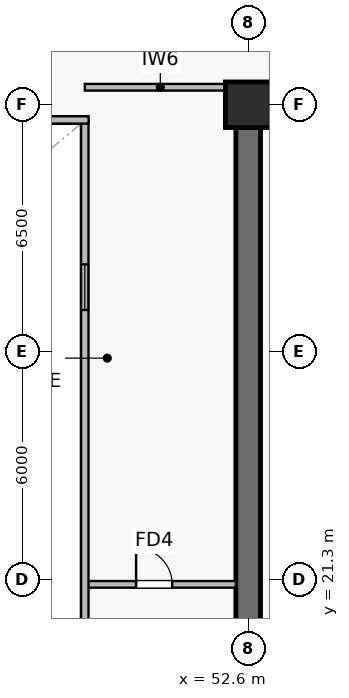
"""IFC4 building model, lengths in metres.
Left out: names, types, materials, properties, quantities, classifications, styles, units other than length and angle.
Written with IfcOpenShell. Run it as: python <this file> out.ifc"""

import sys

from ifc_helpers import new_model, si_unit, direction, frame, frame_2d, origin, origin_2d, place, context, subcontext, project, spatial, rectangle, extrude, source, transform, mapped, element, fill, save


model = new_model("IFC4")
c1 = context("Model", 3, precision=1e-05, world=origin(), true_north=direction((0.0, 1.0)))
c2 = subcontext(c1, "Body", "Model", "MODEL_VIEW")
j1 = project(units=[si_unit("LENGTHUNIT", "METRE"), si_unit("PLANEANGLEUNIT", "RADIAN")], contexts=[c1])
p1 = place(None, origin())
s1 = spatial("IfcSite", under=j1, at=p1, CompositionType="ELEMENT")
p2 = place(p1, origin())
s2 = spatial("IfcBuilding", under=s1, at=p2, CompositionType="ELEMENT")
p3 = place(p2, frame((0.0, 0.0, 113.3)))
s3 = spatial("IfcBuildingStorey", under=s2, at=p3, CompositionType="ELEMENT", Elevation=113.3)
p4 = place(p3, frame((52.275, 33.8, 0.0), z_axis=(0.0, 0.0, 1.0), x_axis=(1.0, 0.0, 0.0)))
e1 = element("IfcWall", 1, at=p4, inside=s3, PredefinedType="SHEAR", context=c2, shape_type="SweptSolid", body=[
    extrude(rectangle(XDim=15.45, YDim=0.65, at=frame_2d((7.725, 0.0))), origin(), (0.0, 0.0, 1.0), 3.79),
])
p5 = place(p4, frame((7.675, 0.0, 0.0)))
e2 = element("IfcOpeningElement", 2, at=p5, cuts=e1, PredefinedType="OPENING", context=c2, shape_type="SweptSolid", body=[
    extrude(rectangle(XDim=0.95, YDim=2.15, at=frame_2d((0.475, 1.075))), frame((0.0, 0.335, 0.0), z_axis=(0.0, -1.0, 0.0), x_axis=(1.0, 0.0, 0.0)), (0.0, 0.0, 1.0), 0.67),
])
p6 = place(p4, frame((2.61, 0.0, 0.0)))
e3 = element("IfcOpeningElement", 3, at=p6, cuts=e1, PredefinedType="OPENING", context=c2, shape_type="SweptSolid", body=[
    extrude(rectangle(XDim=0.95, YDim=2.15, at=frame_2d((0.475, 1.075))), frame((0.0, 0.335, 0.0), z_axis=(0.0, -1.0, 0.0), x_axis=(1.0, 0.0, 0.0)), (0.0, 0.0, 1.0), 0.67),
])
p7 = place(p3, frame((52.6, 15.125, 0.0), z_axis=(0.0, 0.0, 1.0), x_axis=(0.0, 1.0, 0.0)))
e4 = element("IfcWall", 4, at=p7, inside=s3, PredefinedType="SHEAR", context=c2, shape_type="SweptSolid", body=[
    extrude(rectangle(XDim=18.35, YDim=0.65, at=frame_2d((9.175, 0.0))), origin(), (0.0, 0.0, 1.0), 3.79),
])
p8 = place(p7, frame((3.425, 0.0, 0.0)))
e5 = element("IfcOpeningElement", 5, at=p8, cuts=e4, PredefinedType="OPENING", context=c2, shape_type="SweptSolid", body=[
    extrude(rectangle(XDim=1.42, YDim=2.2, at=frame_2d((0.71, 1.1))), frame((0.0, 0.335, 0.0), z_axis=(0.0, -1.0, 0.0), x_axis=(1.0, 0.0, 0.0)), (0.0, 0.0, 1.0), 0.67),
])
m1 = source(origin(), c2, "Body", "SweptSolid", [
    extrude(rectangle(XDim=1.2, YDim=1.2, at=origin_2d()), origin(), (0.0, 0.0, 1.0), 4.1),
])
p9 = place(p3, frame((52.6, 33.8, 0.0), z_axis=(0.0, 0.0, 1.0), x_axis=(1.0, 0.0, 0.0)))
e6 = element("IfcColumn", 6, at=p9, inside=s3, PredefinedType="COLUMN", context=c2, shape_type="MappedRepresentation", body=[
    mapped(m1, transform((0.0, 0.0, 0.0), scale=1.0)),
])
p10 = place(p3, frame((48.3, 34.26, 0.0), z_axis=(0.0, 0.0, 1.0), x_axis=(1.0, 0.0, 0.0)))
e7 = element("IfcWall", 7, at=p10, inside=s3, PredefinedType="PARTITIONING", context=c2, shape_type="SweptSolid", body=[
    extrude(rectangle(XDim=3.975, YDim=0.175, at=frame_2d((1.987, 0.0))), origin(), (0.0, 0.0, 1.0), 3.475),
])
p11 = place(p3, frame((48.3, 21.18, 0.0), z_axis=(0.0, 0.0, 1.0), x_axis=(1.0, 0.0, 0.0)))
e8 = element("IfcWall", 8, at=p11, inside=s3, PredefinedType="PARTITIONING", context=c2, shape_type="SweptSolid", body=[
    extrude(rectangle(XDim=3.975, YDim=0.175, at=frame_2d((1.987, 0.0))), origin(), (0.0, 0.0, 1.0), 3.79),
])
p12 = place(p11, frame((1.35, 0.0, 0.0)))
e9 = element("IfcOpeningElement", 9, at=p12, cuts=e8, PredefinedType="OPENING", context=c2, shape_type="SweptSolid", body=[
    extrude(rectangle(XDim=0.95, YDim=2.15, at=frame_2d((0.475, 1.075))), frame((0.0, 0.098, 0.0), z_axis=(0.0, -1.0, 0.0), x_axis=(1.0, 0.0, 0.0)), (0.0, 0.0, 1.0), 0.195),
])
p13 = place(p3, frame((48.3, 15.2, 0.0), z_axis=(0.0, 0.0, 1.0), x_axis=(0.0, 1.0, 0.0)))
e10 = element("IfcWall", 10, at=p13, inside=s3, PredefinedType="SOLIDWALL", context=c2, shape_type="SweptSolid", body=[
    extrude(rectangle(XDim=18.2, YDim=0.195, at=frame_2d((9.1, 0.0))), origin(), (0.0, 0.0, 1.0), 3.79),
])
p14 = place(p13, frame((1.8, 0.0, 0.9)))
e11 = element("IfcOpeningElement", 11, at=p14, cuts=e10, PredefinedType="OPENING", context=c2, shape_type="SweptSolid", body=[
    extrude(rectangle(XDim=1.2, YDim=1.35, at=frame_2d((0.6, 0.675))), frame((0.0, 0.107, 0.0), z_axis=(0.0, -1.0, 0.0), x_axis=(1.0, 0.0, 0.0)), (0.0, 0.0, 1.0), 0.215),
])
p15 = place(p13, frame((13.2, 0.0, 0.9)))
e12 = element("IfcOpeningElement", 12, at=p15, cuts=e10, PredefinedType="OPENING", context=c2, shape_type="SweptSolid", body=[
    extrude(rectangle(XDim=1.2, YDim=1.35, at=frame_2d((0.6, 0.675))), frame((0.0, 0.107, 0.0), z_axis=(0.0, -1.0, 0.0), x_axis=(1.0, 0.0, 0.0)), (0.0, 0.0, 1.0), 0.215),
])
p16 = place(p3, frame((26.4, 33.4, 0.0), z_axis=(0.0, 0.0, 1.0), x_axis=(1.0, 0.0, 0.0)))
e13 = element("IfcWall", 13, at=p16, inside=s3, PredefinedType="SOLIDWALL", context=c2, shape_type="SweptSolid", body=[
    extrude(rectangle(XDim=22.0, YDim=0.195, at=frame_2d((11.0, 0.0))), origin(), (0.0, 0.0, 1.0), 3.79),
])
m2 = source(origin(), c2, "Body", "SweptSolid", [
    extrude(rectangle(XDim=1.2, YDim=1.35, at=frame_2d((0.6, 0.675))), frame((0.0, 0.03, 0.0), z_axis=(0.0, -1.0, 0.0), x_axis=(1.0, 0.0, 0.0)), (0.0, 0.0, 1.0), 0.06),
])
p17 = place(p15, origin())
e14 = element("IfcWindow", 14, at=p17, inside=s3, PartitioningType="SINGLE_PANEL", PredefinedType="WINDOW", context=c2, shape_type="MappedRepresentation", body=[
    mapped(m2, transform((0.0, 0.0, 0.0), scale=1.0)),
])
fill(e12, e14)
m3 = source(origin(), c2, "Body", "SweptSolid", [
    extrude(rectangle(XDim=0.95, YDim=2.15, at=frame_2d((0.475, 1.075))), frame((0.0, 0.025, 0.0), z_axis=(0.0, -1.0, 0.0), x_axis=(1.0, 0.0, 0.0)), (0.0, 0.0, 1.0), 0.05),
])
p18 = place(p12, origin())
e15 = element("IfcDoor", 15, at=p18, inside=s3, OperationType="SINGLE_SWING_LEFT", PredefinedType="DOOR", context=c2, shape_type="MappedRepresentation", body=[
    mapped(m3, transform((0.0, 0.0, 0.0), scale=1.0)),
])
fill(e9, e15)
save(model, sys.argv[1])
